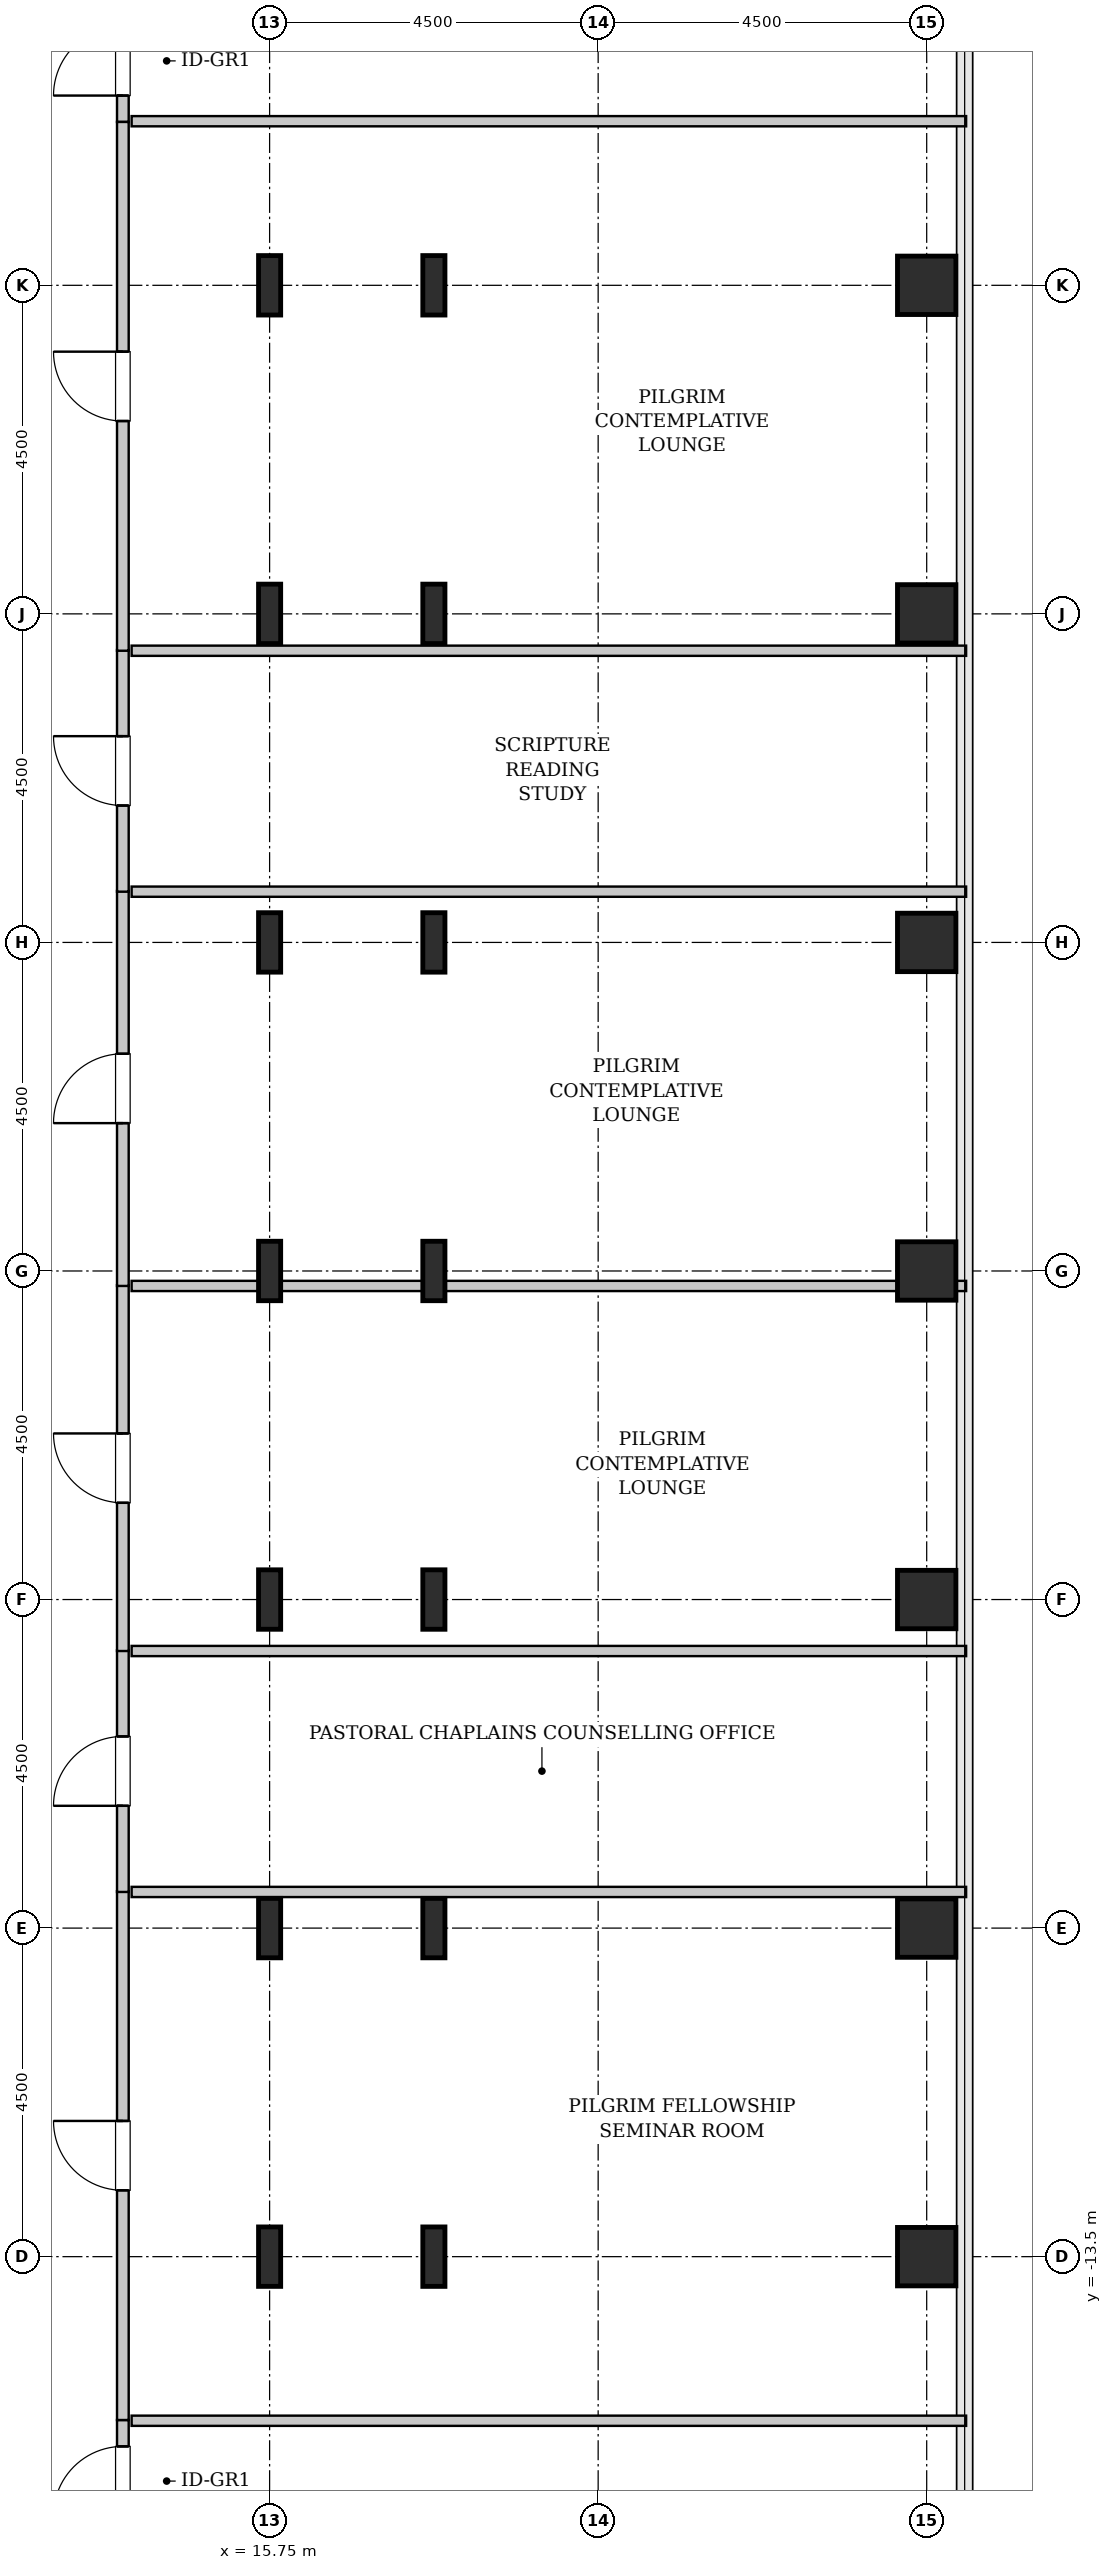
"""IFC4 building model, lengths in metres.
Left out: names, types, materials, properties, quantities, classifications, styles, units other than length and angle.
Written with IfcOpenShell. Run it as: python <this file> out.ifc"""

import sys

from ifc_helpers import new_model, si_unit, direction, frame, frame_2d, origin, origin_2d, place, context, subcontext, project, spatial, rectangle, hollow_rectangle, i_section, extrude, source, transform, mapped, element, fill, save


model = new_model("IFC4")
c1 = context("Model", 3, precision=1e-05, world=origin(), true_north=direction((0.0, 1.0)))
c2 = subcontext(c1, "Body", "Model", "MODEL_VIEW")
j1 = project(units=[si_unit("LENGTHUNIT", "METRE"), si_unit("PLANEANGLEUNIT", "RADIAN")], contexts=[c1])
p1 = place(None, origin())
s1 = spatial("IfcSite", under=j1, at=p1, CompositionType="ELEMENT")
p2 = place(p1, origin())
s2 = spatial("IfcBuilding", under=s1, at=p2, CompositionType="ELEMENT")
p3 = place(p2, frame((0.0, 0.0, 175.4)))
s3 = spatial("IfcBuildingStorey", under=s2, at=p3, CompositionType="ELEMENT", Elevation=175.4)
m1 = source(origin(), c2, "Body", "SweptSolid", [
    extrude(i_section(OverallWidth=0.303, OverallDepth=0.814, WebThickness=0.021, FlangeThickness=0.04, FilletRadius=0.03, at=origin_2d()), origin(), (0.0, 0.0, 1.0), 3.8),
])
for number, where, z_axis, x_axis in (
    (1, (15.75, -13.5, 0.0), (0.0, 0.0, 1.0), (1.0, 0.0, 0.0)),
    (2, (15.75, -9.0, 0.0), (0.0, 0.0, 1.0), (1.0, 0.0, 0.0)),
    (3, (15.75, -4.5, 0.0), (0.0, 0.0, 1.0), (1.0, 0.0, 0.0)),
    (4, (15.75, 0.0, 0.0), (0.0, 0.0, 1.0), (1.0, 0.0, 0.0)),
    (5, (15.75, 4.5, 0.0), (0.0, 0.0, 1.0), (1.0, 0.0, 0.0)),
    (6, (15.75, 9.0, 0.0), (0.0, 0.0, 1.0), (1.0, 0.0, 0.0)),
    (7, (15.75, 13.5, 0.0), (0.0, 0.0, 1.0), (1.0, 0.0, 0.0)),
    (8, (18.0, -13.5, 0.0), (0.0, 0.0, 1.0), (1.0, 0.0, 0.0)),
    (9, (18.0, -9.0, 0.0), (0.0, 0.0, 1.0), (1.0, 0.0, 0.0)),
    (10, (18.0, -4.5, 0.0), (0.0, 0.0, 1.0), (1.0, 0.0, 0.0)),
    (11, (18.0, 0.0, 0.0), (0.0, 0.0, 1.0), (1.0, 0.0, 0.0)),
    (12, (18.0, 4.5, 0.0), (0.0, 0.0, 1.0), (1.0, 0.0, 0.0)),
    (13, (18.0, 9.0, 0.0), (0.0, 0.0, 1.0), (1.0, 0.0, 0.0)),
    (14, (18.0, 13.5, 0.0), (0.0, 0.0, 1.0), (1.0, 0.0, 0.0)),
):
    element("IfcColumn", number, at=place(p3, frame(where, z_axis=z_axis, x_axis=x_axis)), inside=s3, PredefinedType="COLUMN", context=c2, shape_type="MappedRepresentation", body=[
        mapped(m1, transform((0.0, 0.0, 0.0), x_axis=(1.0, 0.0, 0.0), y_axis=(0.0, 1.0, 0.0), z_axis=(0.0, 0.0, 1.0), scale=1.0)),
    ])
m2 = source(origin(), c2, "Body", "SweptSolid", [
    extrude(hollow_rectangle(XDim=0.8, YDim=0.8, WallThickness=0.04, InnerFilletRadius=0.04, OuterFilletRadius=0.08, at=origin_2d()), origin(), (0.0, 0.0, 1.0), 3.8),
])
for number, where, z_axis, x_axis in (
    (15, (24.75, -13.5, 0.0), (0.0, 0.0, 1.0), (1.0, 0.0, 0.0)),
    (16, (24.75, -9.0, 0.0), (0.0, 0.0, 1.0), (1.0, 0.0, 0.0)),
    (17, (24.75, -4.5, 0.0), (0.0, 0.0, 1.0), (1.0, 0.0, 0.0)),
    (18, (24.75, 0.0, 0.0), (0.0, 0.0, 1.0), (1.0, 0.0, 0.0)),
    (19, (24.75, 4.5, 0.0), (0.0, 0.0, 1.0), (1.0, 0.0, 0.0)),
    (20, (24.75, 9.0, 0.0), (0.0, 0.0, 1.0), (1.0, 0.0, 0.0)),
    (21, (24.75, 13.5, 0.0), (0.0, 0.0, 1.0), (1.0, 0.0, 0.0)),
):
    element("IfcColumn", number, at=place(p3, frame(where, z_axis=z_axis, x_axis=x_axis)), inside=s3, PredefinedType="COLUMN", context=c2, shape_type="MappedRepresentation", body=[
        mapped(m2, transform((0.0, 0.0, 0.0), x_axis=(1.0, 0.0, 0.0), y_axis=(0.0, 1.0, 0.0), z_axis=(0.0, 0.0, 1.0), scale=1.0)),
    ])
m3 = source(origin(), c2, "Body", "SweptSolid", [
    extrude(rectangle(XDim=7.302, YDim=0.16, at=frame_2d((3.651, 0.0))), origin(), (0.0, 0.0, 1.0), 3.535),
])
p4 = place(p3, frame((13.74, -23.04, 0.0), z_axis=(0.0, 0.0, 1.0), x_axis=(0.0, 1.0, 0.0)))
e22 = element("IfcWall", 22, at=p4, inside=s3, PredefinedType="PARTITIONING", context=c2, shape_type="MappedRepresentation", body=[
    mapped(m3, transform((0.0, 0.0, 0.0), x_axis=(1.0, 0.0, 0.0), y_axis=(0.0, 1.0, 0.0), z_axis=(0.0, 0.0, 1.0), scale=1.0)),
])
p5 = place(p4, frame((5.991, 0.0, 0.0)))
e23 = element("IfcOpeningElement", 23, at=p5, cuts=e22, PredefinedType="OPENING", context=c2, shape_type="SweptSolid", body=[
    extrude(rectangle(XDim=0.95, YDim=2.1, at=frame_2d((0.475, 1.05))), frame((0.0, 0.09, 0.0), z_axis=(0.0, -1.0, 0.0), x_axis=(1.0, 0.0, 0.0)), (0.0, 0.0, 1.0), 0.18),
])
m4 = source(origin(), c2, "Body", "SweptSolid", [
    extrude(rectangle(XDim=11.43, YDim=0.14, at=frame_2d((5.715, 0.0))), origin(), (0.0, 0.0, 1.0), 3.535),
])
p6 = place(p3, frame((13.86, -15.748, 0.0), z_axis=(0.0, 0.0, 1.0), x_axis=(1.0, 0.0, 0.0)))
e24 = element("IfcWall", 24, at=p6, inside=s3, PredefinedType="PARTITIONING", context=c2, shape_type="MappedRepresentation", body=[
    mapped(m4, transform((0.0, 0.0, 0.0), x_axis=(1.0, 0.0, 0.0), y_axis=(0.0, 1.0, 0.0), z_axis=(0.0, 0.0, 1.0), scale=1.0)),
])
m5 = source(origin(), c2, "Body", "SweptSolid", [
    extrude(rectangle(XDim=7.242, YDim=0.16, at=frame_2d((3.621, 0.0))), origin(), (0.0, 0.0, 1.0), 3.535),
])
p7 = place(p3, frame((13.74, -15.738, 0.0), z_axis=(0.0, 0.0, 1.0), x_axis=(0.0, 1.0, 0.0)))
e25 = element("IfcWall", 25, at=p7, inside=s3, PredefinedType="PARTITIONING", context=c2, shape_type="MappedRepresentation", body=[
    mapped(m5, transform((0.0, 0.0, 0.0), x_axis=(1.0, 0.0, 0.0), y_axis=(0.0, 1.0, 0.0), z_axis=(0.0, 0.0, 1.0), scale=1.0)),
])
p8 = place(p7, frame((3.146, 0.0, 0.0)))
e26 = element("IfcOpeningElement", 26, at=p8, cuts=e25, PredefinedType="OPENING", context=c2, shape_type="SweptSolid", body=[
    extrude(rectangle(XDim=0.95, YDim=2.1, at=frame_2d((0.475, 1.05))), frame((0.0, 0.09, 0.0), z_axis=(0.0, -1.0, 0.0), x_axis=(1.0, 0.0, 0.0)), (0.0, 0.0, 1.0), 0.18),
])
m6 = source(origin(), c2, "Body", "SweptSolid", [
    extrude(rectangle(XDim=11.43, YDim=0.14, at=frame_2d((5.715, 0.0))), origin(), (0.0, 0.0, 1.0), 2.875),
])
p9 = place(p3, frame((13.86, -8.505, 0.0), z_axis=(0.0, 0.0, 1.0), x_axis=(1.0, 0.0, 0.0)))
e27 = element("IfcWall", 27, at=p9, inside=s3, PredefinedType="PARTITIONING", context=c2, shape_type="MappedRepresentation", body=[
    mapped(m6, transform((0.0, 0.0, 0.0), x_axis=(1.0, 0.0, 0.0), y_axis=(0.0, 1.0, 0.0), z_axis=(0.0, 0.0, 1.0), scale=1.0)),
])
m7 = source(origin(), c2, "Body", "SweptSolid", [
    extrude(rectangle(XDim=3.31, YDim=0.16, at=frame_2d((1.655, 0.0))), origin(), (0.0, 0.0, 1.0), 3.535),
])
p10 = place(p3, frame((13.74, -8.505, 0.0), z_axis=(0.0, 0.0, 1.0), x_axis=(0.0, 1.0, 0.0)))
e28 = element("IfcWall", 28, at=p10, inside=s3, PredefinedType="PARTITIONING", context=c2, shape_type="MappedRepresentation", body=[
    mapped(m7, transform((0.0, 0.0, 0.0), x_axis=(1.0, 0.0, 0.0), y_axis=(0.0, 1.0, 0.0), z_axis=(0.0, 0.0, 1.0), scale=1.0)),
])
p11 = place(p10, frame((1.18, 0.0, 0.0)))
e29 = element("IfcOpeningElement", 29, at=p11, cuts=e28, PredefinedType="OPENING", context=c2, shape_type="SweptSolid", body=[
    extrude(rectangle(XDim=0.95, YDim=2.1, at=frame_2d((0.475, 1.05))), frame((0.0, 0.09, 0.0), z_axis=(0.0, -1.0, 0.0), x_axis=(1.0, 0.0, 0.0)), (0.0, 0.0, 1.0), 0.18),
])
p12 = place(p3, frame((13.86, -5.205, 0.0), z_axis=(0.0, 0.0, 1.0), x_axis=(1.0, 0.0, 0.0)))
e30 = element("IfcWall", 30, at=p12, inside=s3, PredefinedType="PARTITIONING", context=c2, shape_type="MappedRepresentation", body=[
    mapped(m4, transform((0.0, 0.0, 0.0), x_axis=(1.0, 0.0, 0.0), y_axis=(0.0, 1.0, 0.0), z_axis=(0.0, 0.0, 1.0), scale=1.0)),
])
m8 = source(origin(), c2, "Body", "SweptSolid", [
    extrude(rectangle(XDim=5.01, YDim=0.16, at=frame_2d((2.505, 0.0))), origin(), (0.0, 0.0, 1.0), 3.535),
])
p13 = place(p3, frame((13.74, -5.205, 0.0), z_axis=(0.0, 0.0, 1.0), x_axis=(0.0, 1.0, 0.0)))
e31 = element("IfcWall", 31, at=p13, inside=s3, PredefinedType="PARTITIONING", context=c2, shape_type="MappedRepresentation", body=[
    mapped(m8, transform((0.0, 0.0, 0.0), x_axis=(1.0, 0.0, 0.0), y_axis=(0.0, 1.0, 0.0), z_axis=(0.0, 0.0, 1.0), scale=1.0)),
])
p14 = place(p13, frame((2.03, 0.0, 0.0)))
e32 = element("IfcOpeningElement", 32, at=p14, cuts=e31, PredefinedType="OPENING", context=c2, shape_type="SweptSolid", body=[
    extrude(rectangle(XDim=0.95, YDim=2.1, at=frame_2d((0.475, 1.05))), frame((0.0, 0.09, 0.0), z_axis=(0.0, -1.0, 0.0), x_axis=(1.0, 0.0, 0.0)), (0.0, 0.0, 1.0), 0.18),
])
p15 = place(p3, frame((13.86, -0.205, 0.0), z_axis=(0.0, 0.0, 1.0), x_axis=(1.0, 0.0, 0.0)))
e33 = element("IfcWall", 33, at=p15, inside=s3, PredefinedType="PARTITIONING", context=c2, shape_type="MappedRepresentation", body=[
    mapped(m6, transform((0.0, 0.0, 0.0), x_axis=(1.0, 0.0, 0.0), y_axis=(0.0, 1.0, 0.0), z_axis=(0.0, 0.0, 1.0), scale=1.0)),
])
m9 = source(origin(), c2, "Body", "SweptSolid", [
    extrude(rectangle(XDim=5.41, YDim=0.16, at=frame_2d((2.705, 0.0))), origin(), (0.0, 0.0, 1.0), 3.535),
])
p16 = place(p3, frame((13.74, -0.205, 0.0), z_axis=(0.0, 0.0, 1.0), x_axis=(0.0, 1.0, 0.0)))
e34 = element("IfcWall", 34, at=p16, inside=s3, PredefinedType="PARTITIONING", context=c2, shape_type="MappedRepresentation", body=[
    mapped(m9, transform((0.0, 0.0, 0.0), x_axis=(1.0, 0.0, 0.0), y_axis=(0.0, 1.0, 0.0), z_axis=(0.0, 0.0, 1.0), scale=1.0)),
])
p17 = place(p16, frame((2.23, 0.0, 0.0)))
e35 = element("IfcOpeningElement", 35, at=p17, cuts=e34, PredefinedType="OPENING", context=c2, shape_type="SweptSolid", body=[
    extrude(rectangle(XDim=0.95, YDim=2.1, at=frame_2d((0.475, 1.05))), frame((0.0, 0.09, 0.0), z_axis=(0.0, -1.0, 0.0), x_axis=(1.0, 0.0, 0.0)), (0.0, 0.0, 1.0), 0.18),
])
p18 = place(p3, frame((13.86, 5.195, 0.0), z_axis=(0.0, 0.0, 1.0), x_axis=(1.0, 0.0, 0.0)))
e36 = element("IfcWall", 36, at=p18, inside=s3, PredefinedType="PARTITIONING", context=c2, shape_type="MappedRepresentation", body=[
    mapped(m4, transform((0.0, 0.0, 0.0), x_axis=(1.0, 0.0, 0.0), y_axis=(0.0, 1.0, 0.0), z_axis=(0.0, 0.0, 1.0), scale=1.0)),
])
p19 = place(p3, frame((13.74, 5.195, 0.0), z_axis=(0.0, 0.0, 1.0), x_axis=(0.0, 1.0, 0.0)))
e37 = element("IfcWall", 37, at=p19, inside=s3, PredefinedType="PARTITIONING", context=c2, shape_type="MappedRepresentation", body=[
    mapped(m7, transform((0.0, 0.0, 0.0), x_axis=(1.0, 0.0, 0.0), y_axis=(0.0, 1.0, 0.0), z_axis=(0.0, 0.0, 1.0), scale=1.0)),
])
p20 = place(p19, frame((1.18, 0.0, 0.0)))
e38 = element("IfcOpeningElement", 38, at=p20, cuts=e37, PredefinedType="OPENING", context=c2, shape_type="SweptSolid", body=[
    extrude(rectangle(XDim=0.95, YDim=2.1, at=frame_2d((0.475, 1.05))), frame((0.0, 0.09, 0.0), z_axis=(0.0, -1.0, 0.0), x_axis=(1.0, 0.0, 0.0)), (0.0, 0.0, 1.0), 0.18),
])
p21 = place(p3, frame((13.86, 8.495, 0.0), z_axis=(0.0, 0.0, 1.0), x_axis=(1.0, 0.0, 0.0)))
e39 = element("IfcWall", 39, at=p21, inside=s3, PredefinedType="PARTITIONING", context=c2, shape_type="MappedRepresentation", body=[
    mapped(m6, transform((0.0, 0.0, 0.0), x_axis=(1.0, 0.0, 0.0), y_axis=(0.0, 1.0, 0.0), z_axis=(0.0, 0.0, 1.0), scale=1.0)),
])
p22 = place(p3, frame((13.74, 15.738, 0.0), z_axis=(0.0, 0.0, 1.0), x_axis=(0.0, 1.0, 0.0)))
e40 = element("IfcWall", 40, at=p22, inside=s3, PredefinedType="PARTITIONING", context=c2, shape_type="MappedRepresentation", body=[
    mapped(m3, transform((0.0, 0.0, 0.0), x_axis=(1.0, 0.0, 0.0), y_axis=(0.0, 1.0, 0.0), z_axis=(0.0, 0.0, 1.0), scale=1.0)),
])
p23 = place(p22, frame((0.361, 0.0, 0.0)))
e41 = element("IfcOpeningElement", 41, at=p23, cuts=e40, PredefinedType="OPENING", context=c2, shape_type="SweptSolid", body=[
    extrude(rectangle(XDim=0.95, YDim=2.1, at=frame_2d((0.475, 1.05))), frame((0.0, 0.09, 0.0), z_axis=(0.0, -1.0, 0.0), x_axis=(1.0, 0.0, 0.0)), (0.0, 0.0, 1.0), 0.18),
])
p24 = place(p3, frame((13.86, 15.748, 0.0), z_axis=(0.0, 0.0, 1.0), x_axis=(1.0, 0.0, 0.0)))
e42 = element("IfcWall", 42, at=p24, inside=s3, PredefinedType="PARTITIONING", context=c2, shape_type="MappedRepresentation", body=[
    mapped(m4, transform((0.0, 0.0, 0.0), x_axis=(1.0, 0.0, 0.0), y_axis=(0.0, 1.0, 0.0), z_axis=(0.0, 0.0, 1.0), scale=1.0)),
])
p25 = place(p3, frame((13.74, 8.495, 0.0), z_axis=(0.0, 0.0, 1.0), x_axis=(0.0, 1.0, 0.0)))
e43 = element("IfcWall", 43, at=p25, inside=s3, PredefinedType="PARTITIONING", context=c2, shape_type="MappedRepresentation", body=[
    mapped(m5, transform((0.0, 0.0, 0.0), x_axis=(1.0, 0.0, 0.0), y_axis=(0.0, 1.0, 0.0), z_axis=(0.0, 0.0, 1.0), scale=1.0)),
])
p26 = place(p25, frame((3.146, 0.0, 0.0)))
e44 = element("IfcOpeningElement", 44, at=p26, cuts=e43, PredefinedType="OPENING", context=c2, shape_type="SweptSolid", body=[
    extrude(rectangle(XDim=0.95, YDim=2.1, at=frame_2d((0.475, 1.05))), frame((0.0, 0.09, 0.0), z_axis=(0.0, -1.0, 0.0), x_axis=(1.0, 0.0, 0.0)), (0.0, 0.0, 1.0), 0.18),
])
m10 = source(origin(), c2, "Body", "SweptSolid", [
    extrude(rectangle(XDim=0.95, YDim=2.1, at=frame_2d((0.475, 1.05))), frame((0.0, 0.025, 0.0), z_axis=(0.0, -1.0, 0.0), x_axis=(1.0, 0.0, 0.0)), (0.0, 0.0, 1.0), 0.05),
])
p27 = place(p5, origin())
e45 = element("IfcDoor", 45, at=p27, inside=s3, OperationType="SINGLE_SWING_LEFT", PredefinedType="DOOR", context=c2, shape_type="MappedRepresentation", body=[
    mapped(m10, transform((0.0, 0.0, 0.0), x_axis=(1.0, 0.0, 0.0), y_axis=(0.0, 1.0, 0.0), z_axis=(0.0, 0.0, 1.0), scale=1.0)),
])
fill(e23, e45)
p28 = place(p8, origin())
e46 = element("IfcDoor", 46, at=p28, inside=s3, OperationType="SINGLE_SWING_RIGHT", PredefinedType="DOOR", context=c2, shape_type="MappedRepresentation", body=[
    mapped(m10, transform((0.0, 0.0, 0.0), x_axis=(1.0, 0.0, 0.0), y_axis=(0.0, 1.0, 0.0), z_axis=(0.0, 0.0, 1.0), scale=1.0)),
])
fill(e26, e46)
p29 = place(p11, origin())
e47 = element("IfcDoor", 47, at=p29, inside=s3, OperationType="SINGLE_SWING_LEFT", PredefinedType="DOOR", context=c2, shape_type="MappedRepresentation", body=[
    mapped(m10, transform((0.0, 0.0, 0.0), x_axis=(1.0, 0.0, 0.0), y_axis=(0.0, 1.0, 0.0), z_axis=(0.0, 0.0, 1.0), scale=1.0)),
])
fill(e29, e47)
p30 = place(p14, origin())
e48 = element("IfcDoor", 48, at=p30, inside=s3, OperationType="SINGLE_SWING_RIGHT", PredefinedType="DOOR", context=c2, shape_type="MappedRepresentation", body=[
    mapped(m10, transform((0.0, 0.0, 0.0), x_axis=(1.0, 0.0, 0.0), y_axis=(0.0, 1.0, 0.0), z_axis=(0.0, 0.0, 1.0), scale=1.0)),
])
fill(e32, e48)
p31 = place(p17, origin())
e49 = element("IfcDoor", 49, at=p31, inside=s3, OperationType="SINGLE_SWING_LEFT", PredefinedType="DOOR", context=c2, shape_type="MappedRepresentation", body=[
    mapped(m10, transform((0.0, 0.0, 0.0), x_axis=(1.0, 0.0, 0.0), y_axis=(0.0, 1.0, 0.0), z_axis=(0.0, 0.0, 1.0), scale=1.0)),
])
fill(e35, e49)
p32 = place(p20, origin())
e50 = element("IfcDoor", 50, at=p32, inside=s3, OperationType="SINGLE_SWING_RIGHT", PredefinedType="DOOR", context=c2, shape_type="MappedRepresentation", body=[
    mapped(m10, transform((0.0, 0.0, 0.0), x_axis=(1.0, 0.0, 0.0), y_axis=(0.0, 1.0, 0.0), z_axis=(0.0, 0.0, 1.0), scale=1.0)),
])
fill(e38, e50)
p33 = place(p23, origin())
e51 = element("IfcDoor", 51, at=p33, inside=s3, OperationType="SINGLE_SWING_LEFT", PredefinedType="DOOR", context=c2, shape_type="MappedRepresentation", body=[
    mapped(m10, transform((0.0, 0.0, 0.0), x_axis=(1.0, 0.0, 0.0), y_axis=(0.0, 1.0, 0.0), z_axis=(0.0, 0.0, 1.0), scale=1.0)),
])
fill(e41, e51)
p34 = place(p26, origin())
e52 = element("IfcDoor", 52, at=p34, inside=s3, OperationType="SINGLE_SWING_RIGHT", PredefinedType="DOOR", context=c2, shape_type="MappedRepresentation", body=[
    mapped(m10, transform((0.0, 0.0, 0.0), x_axis=(1.0, 0.0, 0.0), y_axis=(0.0, 1.0, 0.0), z_axis=(0.0, 0.0, 1.0), scale=1.0)),
])
fill(e44, e52)
save(model, sys.argv[1])
